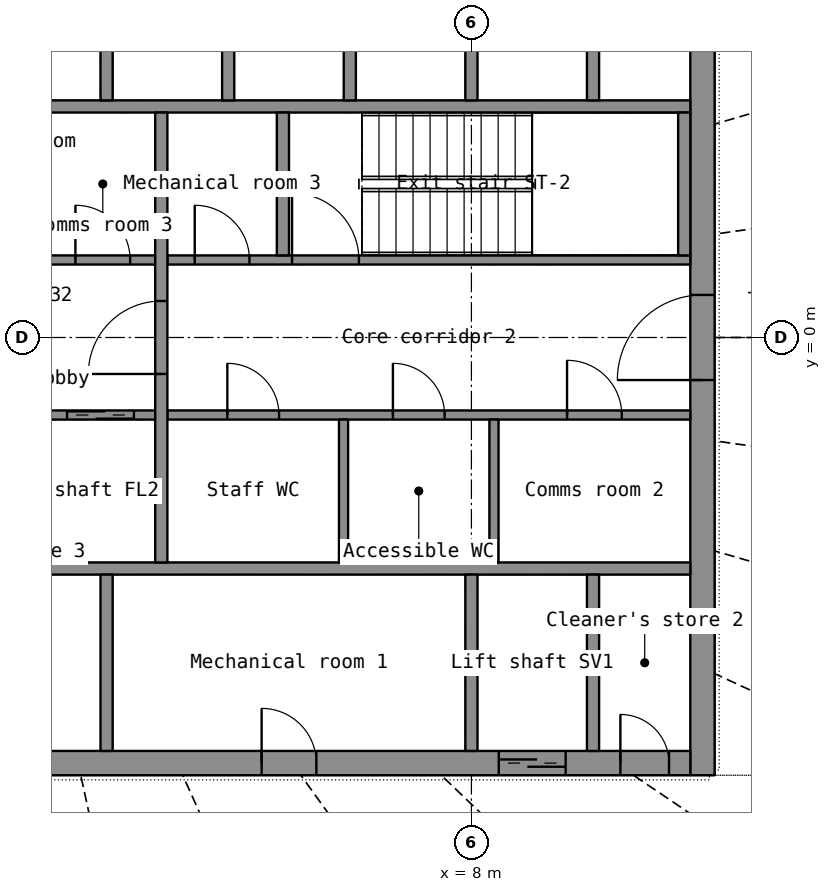
"""IFC4 building model, lengths in metres.
Left out: names, types, materials, properties, quantities, classifications, styles, units other than length and angle.
Written with IfcOpenShell. Run it as: python <this file> out.ifc"""

import sys

from ifc_helpers import new_model, si_unit, direction, frame, frame_2d, origin, place, context, subcontext, project, spatial, rectangle, extrude, element, fill, save


model = new_model("IFC4")
c1 = context("Model", 3, precision=1e-05, world=origin(), true_north=direction((0.0, 1.0)))
c2 = subcontext(c1, "Body", "Model", "MODEL_VIEW")
j1 = project(units=[si_unit("LENGTHUNIT", "METRE"), si_unit("PLANEANGLEUNIT", "RADIAN")], contexts=[c1])
p1 = place(None, origin())
s1 = spatial("IfcSite", under=j1, at=p1, CompositionType="ELEMENT")
p2 = place(p1, origin())
s2 = spatial("IfcBuilding", under=s1, at=p2, CompositionType="ELEMENT")
p3 = place(p2, frame((0.0, 0.0, 250.4)))
s3 = spatial("IfcBuildingStorey", under=s2, at=p3, CompositionType="ELEMENT", Elevation=250.4)
p4 = place(p3, frame((11.8, -7.2, 0.0), z_axis=(0.0, 0.0, 1.0), x_axis=(0.0, 1.0, 0.0)))
e1 = element("IfcWall", 1, at=p4, inside=s3, PredefinedType="SHEAR", context=c2, shape_type="SweptSolid", body=[
    extrude(rectangle(XDim=14.4, YDim=0.4, at=frame_2d((7.2, 0.0))), origin(), (0.0, 0.0, 1.0), 3.3),
])
p5 = place(p4, frame((6.5, 0.0, 0.0)))
e2 = element("IfcOpeningElement", 2, at=p5, cuts=e1, PredefinedType="OPENING", context=c2, shape_type="SweptSolid", body=[
    extrude(rectangle(XDim=1.4, YDim=2.2, at=frame_2d((0.7, 1.1))), frame((0.0, 0.21, 0.0), z_axis=(0.0, -1.0, 0.0), x_axis=(1.0, 0.0, 0.0)), (0.0, 0.0, 1.0), 0.42),
])
p6 = place(p3, frame((-11.6, -7.0, 0.0), z_axis=(0.0, 0.0, 1.0), x_axis=(1.0, 0.0, 0.0)))
e3 = element("IfcWall", 3, at=p6, inside=s3, PredefinedType="SHEAR", context=c2, shape_type="SweptSolid", body=[
    extrude(rectangle(XDim=23.2, YDim=0.4, at=frame_2d((11.6, 0.0))), origin(), (0.0, 0.0, 1.0), 3.3),
])
p7 = place(p6, frame((20.05, 0.0, 0.0)))
e4 = element("IfcOpeningElement", 4, at=p7, cuts=e3, PredefinedType="OPENING", context=c2, shape_type="SweptSolid", body=[
    extrude(rectangle(XDim=1.1, YDim=2.2, at=frame_2d((0.55, 1.1))), frame((0.0, 0.21, 0.0), z_axis=(0.0, -1.0, 0.0), x_axis=(1.0, 0.0, 0.0)), (0.0, 0.0, 1.0), 0.42),
])
p8 = place(p6, frame((4.15, 0.0, 0.0)))
e5 = element("IfcOpeningElement", 5, at=p8, cuts=e3, PredefinedType="OPENING", context=c2, shape_type="SweptSolid", body=[
    extrude(rectangle(XDim=0.9, YDim=2.1, at=frame_2d((0.45, 1.05))), frame((0.0, 0.21, 0.0), z_axis=(0.0, -1.0, 0.0), x_axis=(1.0, 0.0, 0.0)), (0.0, 0.0, 1.0), 0.42),
])
p9 = place(p6, frame((10.15, 0.0, 0.0)))
e6 = element("IfcOpeningElement", 6, at=p9, cuts=e3, PredefinedType="OPENING", context=c2, shape_type="SweptSolid", body=[
    extrude(rectangle(XDim=0.9, YDim=2.1, at=frame_2d((0.45, 1.05))), frame((0.0, 0.21, 0.0), z_axis=(0.0, -1.0, 0.0), x_axis=(1.0, 0.0, 0.0)), (0.0, 0.0, 1.0), 0.42),
])
p10 = place(p6, frame((16.15, 0.0, 0.0)))
e7 = element("IfcOpeningElement", 7, at=p10, cuts=e3, PredefinedType="OPENING", context=c2, shape_type="SweptSolid", body=[
    extrude(rectangle(XDim=0.9, YDim=2.1, at=frame_2d((0.45, 1.05))), frame((0.0, 0.21, 0.0), z_axis=(0.0, -1.0, 0.0), x_axis=(1.0, 0.0, 0.0)), (0.0, 0.0, 1.0), 0.42),
])
p11 = place(p6, frame((0.35, 0.0, 0.0)))
e8 = element("IfcOpeningElement", 8, at=p11, cuts=e3, PredefinedType="OPENING", context=c2, shape_type="SweptSolid", body=[
    extrude(rectangle(XDim=0.8, YDim=2.05, at=frame_2d((0.4, 1.025))), frame((0.0, 0.21, 0.0), z_axis=(0.0, -1.0, 0.0), x_axis=(1.0, 0.0, 0.0)), (0.0, 0.0, 1.0), 0.42),
])
p12 = place(p6, frame((22.05, 0.0, 0.0)))
e9 = element("IfcOpeningElement", 9, at=p12, cuts=e3, PredefinedType="OPENING", context=c2, shape_type="SweptSolid", body=[
    extrude(rectangle(XDim=0.8, YDim=2.05, at=frame_2d((0.4, 1.025))), frame((0.0, 0.21, 0.0), z_axis=(0.0, -1.0, 0.0), x_axis=(1.0, 0.0, 0.0)), (0.0, 0.0, 1.0), 0.42),
])
for number, where, z_axis, x_axis in (
    (10, (-11.6, -3.8, 0.0), (0.0, 0.0, 1.0), (1.0, 0.0, 0.0)),
    (11, (-11.6, 3.8, 0.0), (0.0, 0.0, 1.0), (1.0, 0.0, 0.0)),
):
    element("IfcWall", number, at=place(p3, frame(where, z_axis=z_axis, x_axis=x_axis)), inside=s3, PredefinedType="SHEAR", context=c2, shape_type="SweptSolid", body=[
        extrude(rectangle(XDim=23.2, YDim=0.2, at=frame_2d((11.6, 0.0))), origin(), (0.0, 0.0, 1.0), 3.3),
    ])
for number, where, z_axis, x_axis in (
    (12, (8.0, -6.8, 0.0), (0.0, 0.0, 1.0), (0.0, 1.0, 0.0)),
    (13, (10.0, -6.8, 0.0), (0.0, 0.0, 1.0), (0.0, 1.0, 0.0)),
):
    element("IfcWall", number, at=place(p3, frame(where, z_axis=z_axis, x_axis=x_axis)), inside=s3, PredefinedType="SHEAR", context=c2, shape_type="SweptSolid", body=[
        extrude(rectangle(XDim=2.9, YDim=0.2, at=frame_2d((1.45, 0.0))), origin(), (0.0, 0.0, 1.0), 3.3),
    ])
p13 = place(p3, frame((2.0, -6.8, 0.0), z_axis=(0.0, 0.0, 1.0), x_axis=(0.0, 1.0, 0.0)))
e14 = element("IfcWall", 14, at=p13, inside=s3, PredefinedType="PARTITIONING", context=c2, shape_type="SweptSolid", body=[
    extrude(rectangle(XDim=2.9, YDim=0.2, at=frame_2d((1.45, 0.0))), origin(), (0.0, 0.0, 1.0), 3.3),
])
for number, where, z_axis, x_axis in (
    (15, (2.0, 3.9, 0.0), (0.0, 0.0, 1.0), (0.0, 1.0, 0.0)),
    (16, (4.0, 3.9, 0.0), (0.0, 0.0, 1.0), (0.0, 1.0, 0.0)),
    (17, (6.0, 3.9, 0.0), (0.0, 0.0, 1.0), (0.0, 1.0, 0.0)),
    (18, (8.0, 3.9, 0.0), (0.0, 0.0, 1.0), (0.0, 1.0, 0.0)),
    (19, (10.0, 3.9, 0.0), (0.0, 0.0, 1.0), (0.0, 1.0, 0.0)),
):
    element("IfcWall", number, at=place(p3, frame(where, z_axis=z_axis, x_axis=x_axis)), inside=s3, PredefinedType="SHEAR", context=c2, shape_type="SweptSolid", body=[
        extrude(rectangle(XDim=2.9, YDim=0.2, at=frame_2d((1.45, 0.0))), origin(), (0.0, 0.0, 1.0), 3.3),
    ])
p14 = place(p3, frame((-2.8, -1.275, 0.0), z_axis=(0.0, 0.0, 1.0), x_axis=(1.0, 0.0, 0.0)))
e20 = element("IfcWall", 20, at=p14, inside=s3, PredefinedType="SHEAR", context=c2, shape_type="SweptSolid", body=[
    extrude(rectangle(XDim=5.6, YDim=0.15, at=frame_2d((2.8, 0.0))), origin(), (0.0, 0.0, 1.0), 3.3),
])
p15 = place(p14, frame((4.15, 0.0, 0.0)))
e21 = element("IfcOpeningElement", 21, at=p15, cuts=e20, PredefinedType="OPENING", context=c2, shape_type="SweptSolid", body=[
    extrude(rectangle(XDim=1.1, YDim=2.2, at=frame_2d((0.55, 1.1))), frame((0.0, 0.085, 0.0), z_axis=(0.0, -1.0, 0.0), x_axis=(1.0, 0.0, 0.0)), (0.0, 0.0, 1.0), 0.17),
])
p16 = place(p14, frame((0.499, 0.0, 0.0)))
e22 = element("IfcOpeningElement", 22, at=p16, cuts=e20, PredefinedType="OPENING", context=c2, shape_type="SweptSolid", body=[
    extrude(rectangle(XDim=0.9, YDim=2.1, at=frame_2d((0.45, 1.05))), frame((0.0, 0.085, 0.0), z_axis=(0.0, -1.0, 0.0), x_axis=(1.0, 0.0, 0.0)), (0.0, 0.0, 1.0), 0.17),
])
p17 = place(p14, frame((2.374, 0.0, 0.0)))
e23 = element("IfcOpeningElement", 23, at=p17, cuts=e20, PredefinedType="OPENING", context=c2, shape_type="SweptSolid", body=[
    extrude(rectangle(XDim=0.9, YDim=2.1, at=frame_2d((0.45, 1.05))), frame((0.0, 0.085, 0.0), z_axis=(0.0, -1.0, 0.0), x_axis=(1.0, 0.0, 0.0)), (0.0, 0.0, 1.0), 0.17),
])
p18 = place(p3, frame((3.0, -1.275, 0.0), z_axis=(0.0, 0.0, 1.0), x_axis=(1.0, 0.0, 0.0)))
e24 = element("IfcWall", 24, at=p18, inside=s3, PredefinedType="PARTITIONING", context=c2, shape_type="SweptSolid", body=[
    extrude(rectangle(XDim=8.6, YDim=0.15, at=frame_2d((4.3, 0.0))), origin(), (0.0, 0.0, 1.0), 3.3),
])
p19 = place(p18, frame((0.986, 0.0, 0.0)))
e25 = element("IfcOpeningElement", 25, at=p19, cuts=e24, PredefinedType="OPENING", context=c2, shape_type="SweptSolid", body=[
    extrude(rectangle(XDim=0.85, YDim=2.1, at=frame_2d((0.425, 1.05))), frame((0.0, 0.085, 0.0), z_axis=(0.0, -1.0, 0.0), x_axis=(1.0, 0.0, 0.0)), (0.0, 0.0, 1.0), 0.17),
])
p20 = place(p18, frame((3.709, 0.0, 0.0)))
e26 = element("IfcOpeningElement", 26, at=p20, cuts=e24, PredefinedType="OPENING", context=c2, shape_type="SweptSolid", body=[
    extrude(rectangle(XDim=0.85, YDim=2.1, at=frame_2d((0.425, 1.05))), frame((0.0, 0.085, 0.0), z_axis=(0.0, -1.0, 0.0), x_axis=(1.0, 0.0, 0.0)), (0.0, 0.0, 1.0), 0.17),
])
p21 = place(p18, frame((6.573, 0.0, 0.0)))
e27 = element("IfcOpeningElement", 27, at=p21, cuts=e24, PredefinedType="OPENING", context=c2, shape_type="SweptSolid", body=[
    extrude(rectangle(XDim=0.9, YDim=2.1, at=frame_2d((0.45, 1.05))), frame((0.0, 0.085, 0.0), z_axis=(0.0, -1.0, 0.0), x_axis=(1.0, 0.0, 0.0)), (0.0, 0.0, 1.0), 0.17),
])
p22 = place(p3, frame((-2.8, 1.275, 0.0), z_axis=(0.0, 0.0, 1.0), x_axis=(1.0, 0.0, 0.0)))
e28 = element("IfcWall", 28, at=p22, inside=s3, PredefinedType="SHEAR", context=c2, shape_type="SweptSolid", body=[
    extrude(rectangle(XDim=5.6, YDim=0.15, at=frame_2d((2.8, 0.0))), origin(), (0.0, 0.0, 1.0), 3.3),
])
p23 = place(p22, frame((0.35, 0.0, 0.0)))
e29 = element("IfcOpeningElement", 29, at=p23, cuts=e28, PredefinedType="OPENING", context=c2, shape_type="SweptSolid", body=[
    extrude(rectangle(XDim=1.1, YDim=2.2, at=frame_2d((0.55, 1.1))), frame((0.0, 0.085, 0.0), z_axis=(0.0, -1.0, 0.0), x_axis=(1.0, 0.0, 0.0)), (0.0, 0.0, 1.0), 0.17),
])
p24 = place(p22, frame((2.413, 0.0, 0.0)))
e30 = element("IfcOpeningElement", 30, at=p24, cuts=e28, PredefinedType="OPENING", context=c2, shape_type="SweptSolid", body=[
    extrude(rectangle(XDim=0.9, YDim=2.1, at=frame_2d((0.45, 1.05))), frame((0.0, 0.085, 0.0), z_axis=(0.0, -1.0, 0.0), x_axis=(1.0, 0.0, 0.0)), (0.0, 0.0, 1.0), 0.17),
])
p25 = place(p22, frame((4.288, 0.0, 0.0)))
e31 = element("IfcOpeningElement", 31, at=p25, cuts=e28, PredefinedType="OPENING", context=c2, shape_type="SweptSolid", body=[
    extrude(rectangle(XDim=0.9, YDim=2.1, at=frame_2d((0.45, 1.05))), frame((0.0, 0.085, 0.0), z_axis=(0.0, -1.0, 0.0), x_axis=(1.0, 0.0, 0.0)), (0.0, 0.0, 1.0), 0.17),
])
p26 = place(p3, frame((3.0, 1.275, 0.0), z_axis=(0.0, 0.0, 1.0), x_axis=(1.0, 0.0, 0.0)))
e32 = element("IfcWall", 32, at=p26, inside=s3, PredefinedType="SHEAR", context=c2, shape_type="SweptSolid", body=[
    extrude(rectangle(XDim=8.6, YDim=0.15, at=frame_2d((4.3, 0.0))), origin(), (0.0, 0.0, 1.0), 3.3),
])
p27 = place(p26, frame((2.05, 0.0, 0.0)))
e33 = element("IfcOpeningElement", 33, at=p27, cuts=e32, PredefinedType="OPENING", context=c2, shape_type="SweptSolid", body=[
    extrude(rectangle(XDim=1.1, YDim=2.15, at=frame_2d((0.55, 1.075))), frame((0.0, 0.085, 0.0), z_axis=(0.0, -1.0, 0.0), x_axis=(1.0, 0.0, 0.0)), (0.0, 0.0, 1.0), 0.17),
])
p28 = place(p26, frame((0.45, 0.0, 0.0)))
e34 = element("IfcOpeningElement", 34, at=p28, cuts=e32, PredefinedType="OPENING", context=c2, shape_type="SweptSolid", body=[
    extrude(rectangle(XDim=0.9, YDim=2.1, at=frame_2d((0.45, 1.05))), frame((0.0, 0.085, 0.0), z_axis=(0.0, -1.0, 0.0), x_axis=(1.0, 0.0, 0.0)), (0.0, 0.0, 1.0), 0.17),
])
p29 = place(p3, frame((2.9, -3.7, 0.0), z_axis=(0.0, 0.0, 1.0), x_axis=(0.0, 1.0, 0.0)))
e35 = element("IfcWall", 35, at=p29, inside=s3, PredefinedType="SHEAR", context=c2, shape_type="SweptSolid", body=[
    extrude(rectangle(XDim=7.4, YDim=0.2, at=frame_2d((3.7, 0.0))), origin(), (0.0, 0.0, 1.0), 3.3),
])
p30 = place(p29, frame((3.1, 0.0, 0.0)))
e36 = element("IfcOpeningElement", 36, at=p30, cuts=e35, PredefinedType="OPENING", context=c2, shape_type="SweptSolid", body=[
    extrude(rectangle(XDim=1.2, YDim=2.2, at=frame_2d((0.6, 1.1))), frame((0.0, 0.11, 0.0), z_axis=(0.0, -1.0, 0.0), x_axis=(1.0, 0.0, 0.0)), (0.0, 0.0, 1.0), 0.22),
])
for number, where, z_axis, x_axis in (
    (37, (11.5, 1.35, 0.0), (0.0, 0.0, 1.0), (0.0, 1.0, 0.0)),
    (38, (4.9, 1.35, 0.0), (0.0, 0.0, 1.0), (0.0, 1.0, 0.0)),
):
    element("IfcWall", number, at=place(p3, frame(where, z_axis=z_axis, x_axis=x_axis)), inside=s3, PredefinedType="SHEAR", context=c2, shape_type="SweptSolid", body=[
        extrude(rectangle(XDim=2.35, YDim=0.2, at=frame_2d((1.175, 0.0))), origin(), (0.0, 0.0, 1.0), 3.3),
    ])
for number, where, z_axis, x_axis in (
    (39, (5.897, -3.7, 0.0), (0.0, 0.0, 1.0), (0.0, 1.0, 0.0)),
    (40, (8.371, -3.7, 0.0), (0.0, 0.0, 1.0), (0.0, 1.0, 0.0)),
):
    element("IfcWall", number, at=place(p3, frame(where, z_axis=z_axis, x_axis=x_axis)), inside=s3, PredefinedType="PARTITIONING", context=c2, shape_type="SweptSolid", body=[
        extrude(rectangle(XDim=2.35, YDim=0.15, at=frame_2d((1.175, 0.0))), origin(), (0.0, 0.0, 1.0), 3.3),
    ])
p31 = place(p7, origin())
e41 = element("IfcDoor", 41, at=p31, inside=s3, OperationType="DOUBLE_DOOR_SLIDING", PredefinedType="DOOR", context=c2, shape_type="SweptSolid", body=[
    extrude(rectangle(XDim=1.1, YDim=2.2, at=frame_2d((0.55, 1.1))), frame((0.0, 0.025, 0.0), z_axis=(0.0, -1.0, 0.0), x_axis=(1.0, 0.0, 0.0)), (0.0, 0.0, 1.0), 0.05),
])
fill(e4, e41)
p32 = place(p10, origin())
e42 = element("IfcDoor", 42, at=p32, inside=s3, OperationType="SINGLE_SWING_LEFT", PredefinedType="DOOR", context=c2, shape_type="SweptSolid", body=[
    extrude(rectangle(XDim=0.9, YDim=2.1, at=frame_2d((0.45, 1.05))), frame((0.0, 0.025, 0.0), z_axis=(0.0, -1.0, 0.0), x_axis=(1.0, 0.0, 0.0)), (0.0, 0.0, 1.0), 0.05),
])
fill(e7, e42)
p33 = place(p12, origin())
e43 = element("IfcDoor", 43, at=p33, inside=s3, OperationType="SINGLE_SWING_LEFT", PredefinedType="DOOR", context=c2, shape_type="SweptSolid", body=[
    extrude(rectangle(XDim=0.8, YDim=2.05, at=frame_2d((0.4, 1.025))), frame((0.0, 0.025, 0.0), z_axis=(0.0, -1.0, 0.0), x_axis=(1.0, 0.0, 0.0)), (0.0, 0.0, 1.0), 0.05),
])
fill(e9, e43)
p34 = place(p5, origin())
e44 = element("IfcDoor", 44, at=p34, inside=s3, OperationType="DOUBLE_DOOR_SINGLE_SWING", PredefinedType="DOOR", context=c2, shape_type="SweptSolid", body=[
    extrude(rectangle(XDim=1.4, YDim=2.2, at=frame_2d((0.7, 1.1))), frame((0.0, 0.025, 0.0), z_axis=(0.0, -1.0, 0.0), x_axis=(1.0, 0.0, 0.0)), (0.0, 0.0, 1.0), 0.05),
])
fill(e2, e44)
p35 = place(p30, origin())
e45 = element("IfcDoor", 45, at=p35, inside=s3, OperationType="SINGLE_SWING_LEFT", PredefinedType="DOOR", context=c2, shape_type="SweptSolid", body=[
    extrude(rectangle(XDim=1.2, YDim=2.2, at=frame_2d((0.6, 1.1))), frame((0.0, 0.025, 0.0), z_axis=(0.0, -1.0, 0.0), x_axis=(1.0, 0.0, 0.0)), (0.0, 0.0, 1.0), 0.05),
])
fill(e36, e45)
p36 = place(p15, origin())
e46 = element("IfcDoor", 46, at=p36, inside=s3, OperationType="DOUBLE_DOOR_SLIDING", PredefinedType="DOOR", context=c2, shape_type="SweptSolid", body=[
    extrude(rectangle(XDim=1.1, YDim=2.2, at=frame_2d((0.55, 1.1))), frame((0.0, 0.025, 0.0), z_axis=(0.0, -1.0, 0.0), x_axis=(1.0, 0.0, 0.0)), (0.0, 0.0, 1.0), 0.05),
])
fill(e21, e46)
p37 = place(p27, origin())
e47 = element("IfcDoor", 47, at=p37, inside=s3, OperationType="SINGLE_SWING_LEFT", PredefinedType="DOOR", context=c2, shape_type="SweptSolid", body=[
    extrude(rectangle(XDim=1.1, YDim=2.15, at=frame_2d((0.55, 1.075))), frame((0.0, 0.025, 0.0), z_axis=(0.0, -1.0, 0.0), x_axis=(1.0, 0.0, 0.0)), (0.0, 0.0, 1.0), 0.05),
])
fill(e33, e47)
p38 = place(p19, origin())
e48 = element("IfcDoor", 48, at=p38, inside=s3, OperationType="SINGLE_SWING_LEFT", PredefinedType="DOOR", context=c2, shape_type="SweptSolid", body=[
    extrude(rectangle(XDim=0.85, YDim=2.1, at=frame_2d((0.425, 1.05))), frame((0.0, 0.025, 0.0), z_axis=(0.0, -1.0, 0.0), x_axis=(1.0, 0.0, 0.0)), (0.0, 0.0, 1.0), 0.05),
])
fill(e25, e48)
p39 = place(p20, origin())
e49 = element("IfcDoor", 49, at=p39, inside=s3, OperationType="SINGLE_SWING_LEFT", PredefinedType="DOOR", context=c2, shape_type="SweptSolid", body=[
    extrude(rectangle(XDim=0.85, YDim=2.1, at=frame_2d((0.425, 1.05))), frame((0.0, 0.025, 0.0), z_axis=(0.0, -1.0, 0.0), x_axis=(1.0, 0.0, 0.0)), (0.0, 0.0, 1.0), 0.05),
])
fill(e26, e49)
p40 = place(p21, origin())
e50 = element("IfcDoor", 50, at=p40, inside=s3, OperationType="SINGLE_SWING_LEFT", PredefinedType="DOOR", context=c2, shape_type="SweptSolid", body=[
    extrude(rectangle(XDim=0.9, YDim=2.1, at=frame_2d((0.45, 1.05))), frame((0.0, 0.025, 0.0), z_axis=(0.0, -1.0, 0.0), x_axis=(1.0, 0.0, 0.0)), (0.0, 0.0, 1.0), 0.05),
])
fill(e27, e50)
p41 = place(p25, origin())
e51 = element("IfcDoor", 51, at=p41, inside=s3, OperationType="SINGLE_SWING_LEFT", PredefinedType="DOOR", context=c2, shape_type="SweptSolid", body=[
    extrude(rectangle(XDim=0.9, YDim=2.1, at=frame_2d((0.45, 1.05))), frame((0.0, 0.025, 0.0), z_axis=(0.0, -1.0, 0.0), x_axis=(1.0, 0.0, 0.0)), (0.0, 0.0, 1.0), 0.05),
])
fill(e31, e51)
p42 = place(p28, origin())
e52 = element("IfcDoor", 52, at=p42, inside=s3, OperationType="SINGLE_SWING_LEFT", PredefinedType="DOOR", context=c2, shape_type="SweptSolid", body=[
    extrude(rectangle(XDim=0.9, YDim=2.1, at=frame_2d((0.45, 1.05))), frame((0.0, 0.025, 0.0), z_axis=(0.0, -1.0, 0.0), x_axis=(1.0, 0.0, 0.0)), (0.0, 0.0, 1.0), 0.05),
])
fill(e34, e52)
save(model, sys.argv[1])
